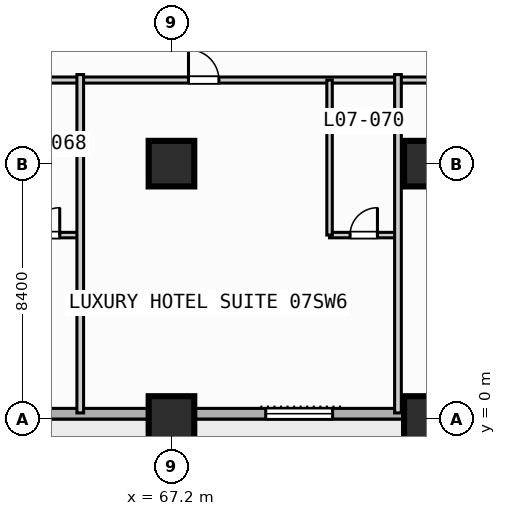
"""IFC4 building model, lengths in metres.
Left out: names, types, materials, properties, quantities, classifications, styles, units other than length and angle.
Written with IfcOpenShell. Run it as: python <this file> out.ifc"""

import sys

from ifc_helpers import new_model, si_unit, direction, frame, frame_2d, origin, origin_2d, place, context, subcontext, project, spatial, rectangle, extrude, element, fill, save


model = new_model("IFC4")
c1 = context("Model", 3, precision=1e-05, world=origin(), true_north=direction((0.0, 1.0)))
c2 = subcontext(c1, "Body", "Model", "MODEL_VIEW")
j1 = project(units=[si_unit("LENGTHUNIT", "METRE"), si_unit("PLANEANGLEUNIT", "RADIAN")], contexts=[c1])
p1 = place(None, origin())
s1 = spatial("IfcSite", under=j1, at=p1, CompositionType="ELEMENT")
p2 = place(p1, origin())
s2 = spatial("IfcBuilding", under=s1, at=p2, CompositionType="ELEMENT")
p3 = place(p2, frame((0.0, 0.0, 35.8)))
s3 = spatial("IfcBuildingStorey", under=s2, at=p3, CompositionType="ELEMENT", Elevation=35.8)
for number, where, z_axis, x_axis in (
    (1, (67.2, 0.0, 0.0), (0.0, 0.0, 1.0), (1.0, 0.0, 0.0)),
    (2, (67.2, 8.4, 0.0), (0.0, 0.0, 1.0), (1.0, 0.0, 0.0)),
    (3, (75.6, 0.0, 0.0), (0.0, 0.0, 1.0), (1.0, 0.0, 0.0)),
    (4, (75.6, 8.4, 0.0), (0.0, 0.0, 1.0), (1.0, 0.0, 0.0)),
):
    element("IfcColumn", number, at=place(p3, frame(where, z_axis=z_axis, x_axis=x_axis)), inside=s3, PredefinedType="COLUMN", context=c2, shape_type="SweptSolid", body=[
        extrude(rectangle(XDim=1.5, YDim=1.5, at=origin_2d()), origin(), (0.0, 0.0, 1.0), 3.8),
    ])
p4 = place(p3, frame((89.225, 0.175, 0.0), z_axis=(0.0, 0.0, 1.0), x_axis=(-1.0, 0.0, 0.0)))
e5 = element("IfcWall", 5, at=p4, inside=s3, PredefinedType="STANDARD", context=c2, shape_type="SweptSolid", body=[
    extrude(rectangle(XDim=86.05, YDim=0.35, at=frame_2d((43.025, 0.0))), origin(), (0.0, 0.0, 1.0), 3.55),
])
p5 = place(p4, frame((67.525, 0.0, 0.0)))
e6 = element("IfcOpeningElement", 6, at=p5, cuts=e5, PredefinedType="OPENING", context=c2, shape_type="SweptSolid", body=[
    extrude(rectangle(XDim=1.4, YDim=2.2, at=frame_2d((0.7, 1.1))), frame((0.0, 0.185, 0.0), z_axis=(0.0, -1.0, 0.0), x_axis=(1.0, 0.0, 0.0)), (0.0, 0.0, 1.0), 0.37),
])
p6 = place(p4, frame((58.725, 0.0, 0.85)))
e7 = element("IfcOpeningElement", 7, at=p6, cuts=e5, PredefinedType="OPENING", context=c2, shape_type="SweptSolid", body=[
    extrude(rectangle(XDim=2.2, YDim=1.8, at=frame_2d((1.1, 0.9))), frame((0.0, 0.185, 0.0), z_axis=(0.0, -1.0, 0.0), x_axis=(1.0, 0.0, 0.0)), (0.0, 0.0, 1.0), 0.37),
])
p7 = place(p4, frame((50.325, 0.0, 0.85)))
e8 = element("IfcOpeningElement", 8, at=p7, cuts=e5, PredefinedType="OPENING", context=c2, shape_type="SweptSolid", body=[
    extrude(rectangle(XDim=2.2, YDim=1.8, at=frame_2d((1.1, 0.9))), frame((0.0, 0.185, 0.0), z_axis=(0.0, -1.0, 0.0), x_axis=(1.0, 0.0, 0.0)), (0.0, 0.0, 1.0), 0.37),
])
p8 = place(p4, frame((41.925, 0.0, 0.85)))
e9 = element("IfcOpeningElement", 9, at=p8, cuts=e5, PredefinedType="OPENING", context=c2, shape_type="SweptSolid", body=[
    extrude(rectangle(XDim=2.2, YDim=1.8, at=frame_2d((1.1, 0.9))), frame((0.0, 0.185, 0.0), z_axis=(0.0, -1.0, 0.0), x_axis=(1.0, 0.0, 0.0)), (0.0, 0.0, 1.0), 0.37),
])
p9 = place(p4, frame((33.525, 0.0, 0.85)))
e10 = element("IfcOpeningElement", 10, at=p9, cuts=e5, PredefinedType="OPENING", context=c2, shape_type="SweptSolid", body=[
    extrude(rectangle(XDim=2.2, YDim=1.8, at=frame_2d((1.1, 0.9))), frame((0.0, 0.185, 0.0), z_axis=(0.0, -1.0, 0.0), x_axis=(1.0, 0.0, 0.0)), (0.0, 0.0, 1.0), 0.37),
])
p10 = place(p4, frame((16.725, 0.0, 0.85)))
e11 = element("IfcOpeningElement", 11, at=p10, cuts=e5, PredefinedType="OPENING", context=c2, shape_type="SweptSolid", body=[
    extrude(rectangle(XDim=2.2, YDim=1.8, at=frame_2d((1.1, 0.9))), frame((0.0, 0.185, 0.0), z_axis=(0.0, -1.0, 0.0), x_axis=(1.0, 0.0, 0.0)), (0.0, 0.0, 1.0), 0.37),
])
p11 = place(p4, frame((8.325, 0.0, 0.85)))
e12 = element("IfcOpeningElement", 12, at=p11, cuts=e5, PredefinedType="OPENING", context=c2, shape_type="SweptSolid", body=[
    extrude(rectangle(XDim=2.2, YDim=1.8, at=frame_2d((1.1, 0.9))), frame((0.0, 0.185, 0.0), z_axis=(0.0, -1.0, 0.0), x_axis=(1.0, 0.0, 0.0)), (0.0, 0.0, 1.0), 0.37),
])
p12 = place(p4, frame((2.4, 0.0, 0.85)))
e13 = element("IfcOpeningElement", 13, at=p12, cuts=e5, PredefinedType="OPENING", context=c2, shape_type="SweptSolid", body=[
    extrude(rectangle(XDim=1.8, YDim=1.8, at=frame_2d((0.9, 0.9))), frame((0.0, 0.185, 0.0), z_axis=(0.0, -1.0, 0.0), x_axis=(1.0, 0.0, 0.0)), (0.0, 0.0, 1.0), 0.37),
])
p13 = place(p3, frame((13.4, 11.15, 0.0), z_axis=(0.0, 0.0, 1.0), x_axis=(1.0, 0.0, 0.0)))
e14 = element("IfcWall", 14, at=p13, inside=s3, PredefinedType="PARTITIONING", context=c2, shape_type="SweptSolid", body=[
    extrude(rectangle(XDim=75.4, YDim=0.2, at=frame_2d((37.7, 0.0))), origin(), (0.0, 0.0, 1.0), 3.55),
])
p14 = place(p13, frame((6.065, 0.0, 0.0)))
e15 = element("IfcOpeningElement", 15, at=p14, cuts=e14, PredefinedType="OPENING", context=c2, shape_type="SweptSolid", body=[
    extrude(rectangle(XDim=1.0, YDim=2.15, at=frame_2d((0.5, 1.075))), frame((0.0, 0.11, 0.0), z_axis=(0.0, -1.0, 0.0), x_axis=(1.0, 0.0, 0.0)), (0.0, 0.0, 1.0), 0.22),
])
p15 = place(p13, frame((13.36, 0.0, 0.0)))
e16 = element("IfcOpeningElement", 16, at=p15, cuts=e14, PredefinedType="OPENING", context=c2, shape_type="SweptSolid", body=[
    extrude(rectangle(XDim=1.0, YDim=2.15, at=frame_2d((0.5, 1.075))), frame((0.0, 0.11, 0.0), z_axis=(0.0, -1.0, 0.0), x_axis=(1.0, 0.0, 0.0)), (0.0, 0.0, 1.0), 0.22),
])
p16 = place(p13, frame((21.785, 0.0, 0.0)))
e17 = element("IfcOpeningElement", 17, at=p16, cuts=e14, PredefinedType="OPENING", context=c2, shape_type="SweptSolid", body=[
    extrude(rectangle(XDim=1.0, YDim=2.15, at=frame_2d((0.5, 1.075))), frame((0.0, 0.11, 0.0), z_axis=(0.0, -1.0, 0.0), x_axis=(1.0, 0.0, 0.0)), (0.0, 0.0, 1.0), 0.22),
])
p17 = place(p13, frame((30.185, 0.0, 0.0)))
e18 = element("IfcOpeningElement", 18, at=p17, cuts=e14, PredefinedType="OPENING", context=c2, shape_type="SweptSolid", body=[
    extrude(rectangle(XDim=1.0, YDim=2.15, at=frame_2d((0.5, 1.075))), frame((0.0, 0.11, 0.0), z_axis=(0.0, -1.0, 0.0), x_axis=(1.0, 0.0, 0.0)), (0.0, 0.0, 1.0), 0.22),
])
p18 = place(p13, frame((41.76, 0.0, 0.0)))
e19 = element("IfcOpeningElement", 19, at=p18, cuts=e14, PredefinedType="OPENING", context=c2, shape_type="SweptSolid", body=[
    extrude(rectangle(XDim=1.0, YDim=2.15, at=frame_2d((0.5, 1.075))), frame((0.0, 0.11, 0.0), z_axis=(0.0, -1.0, 0.0), x_axis=(1.0, 0.0, 0.0)), (0.0, 0.0, 1.0), 0.22),
])
p19 = place(p13, frame((54.36, 0.0, 0.0)))
e20 = element("IfcOpeningElement", 20, at=p19, cuts=e14, PredefinedType="OPENING", context=c2, shape_type="SweptSolid", body=[
    extrude(rectangle(XDim=1.0, YDim=2.15, at=frame_2d((0.5, 1.075))), frame((0.0, 0.11, 0.0), z_axis=(0.0, -1.0, 0.0), x_axis=(1.0, 0.0, 0.0)), (0.0, 0.0, 1.0), 0.22),
])
p20 = place(p13, frame((63.785, 0.0, 0.0)))
e21 = element("IfcOpeningElement", 21, at=p20, cuts=e14, PredefinedType="OPENING", context=c2, shape_type="SweptSolid", body=[
    extrude(rectangle(XDim=1.0, YDim=2.15, at=frame_2d((0.5, 1.075))), frame((0.0, 0.11, 0.0), z_axis=(0.0, -1.0, 0.0), x_axis=(1.0, 0.0, 0.0)), (0.0, 0.0, 1.0), 0.22),
])
p21 = place(p13, frame((70.86, 0.0, 0.0)))
e22 = element("IfcOpeningElement", 22, at=p21, cuts=e14, PredefinedType="OPENING", context=c2, shape_type="SweptSolid", body=[
    extrude(rectangle(XDim=1.0, YDim=2.15, at=frame_2d((0.5, 1.075))), frame((0.0, 0.11, 0.0), z_axis=(0.0, -1.0, 0.0), x_axis=(1.0, 0.0, 0.0)), (0.0, 0.0, 1.0), 0.22),
])
p22 = place(p3, frame((61.95, 6.05, 0.0), z_axis=(0.0, 0.0, 1.0), x_axis=(1.0, 0.0, 0.0)))
e23 = element("IfcWall", 23, at=p22, inside=s3, PredefinedType="PLUMBINGWALL", context=c2, shape_type="SweptSolid", body=[
    extrude(rectangle(XDim=2.25, YDim=0.18, at=frame_2d((1.125, 0.0))), origin(), (0.0, 0.0, 1.0), 3.55),
])
p23 = place(p22, frame((0.675, 0.0, 0.0)))
e24 = element("IfcOpeningElement", 24, at=p23, cuts=e23, PredefinedType="OPENING", context=c2, shape_type="SweptSolid", body=[
    extrude(rectangle(XDim=0.9, YDim=2.1, at=frame_2d((0.45, 1.05))), frame((0.0, 0.1, 0.0), z_axis=(0.0, -1.0, 0.0), x_axis=(1.0, 0.0, 0.0)), (0.0, 0.0, 1.0), 0.2),
])
p24 = place(p3, frame((64.2, 0.2, 0.0), z_axis=(0.0, 0.0, 1.0), x_axis=(0.0, 1.0, 0.0)))
e25 = element("IfcWall", 25, at=p24, inside=s3, PredefinedType="PARTITIONING", context=c2, shape_type="SweptSolid", body=[
    extrude(rectangle(XDim=11.13, YDim=0.22, at=frame_2d((5.565, 0.0))), origin(), (0.0, 0.0, 1.0), 3.55),
])
p25 = place(p3, frame((72.4, 6.05, 0.0), z_axis=(0.0, 0.0, 1.0), x_axis=(1.0, 0.0, 0.0)))
e26 = element("IfcWall", 26, at=p25, inside=s3, PredefinedType="PLUMBINGWALL", context=c2, shape_type="SweptSolid", body=[
    extrude(rectangle(XDim=2.25, YDim=0.18, at=frame_2d((1.125, 0.0))), origin(), (0.0, 0.0, 1.0), 3.55),
])
p26 = place(p25, frame((0.675, 0.0, 0.0)))
e27 = element("IfcOpeningElement", 27, at=p26, cuts=e26, PredefinedType="OPENING", context=c2, shape_type="SweptSolid", body=[
    extrude(rectangle(XDim=0.9, YDim=2.1, at=frame_2d((0.45, 1.05))), frame((0.0, 0.1, 0.0), z_axis=(0.0, -1.0, 0.0), x_axis=(1.0, 0.0, 0.0)), (0.0, 0.0, 1.0), 0.2),
])
p27 = place(p3, frame((72.4, 6.05, 0.0), z_axis=(0.0, 0.0, 1.0), x_axis=(0.0, 1.0, 0.0)))
e28 = element("IfcWall", 28, at=p27, inside=s3, PredefinedType="PLUMBINGWALL", context=c2, shape_type="SweptSolid", body=[
    extrude(rectangle(XDim=5.1, YDim=0.18, at=frame_2d((2.55, 0.0))), origin(), (0.0, 0.0, 1.0), 3.55),
])
p28 = place(p3, frame((74.65, 0.2, 0.0), z_axis=(0.0, 0.0, 1.0), x_axis=(0.0, 1.0, 0.0)))
e29 = element("IfcWall", 29, at=p28, inside=s3, PredefinedType="PARTITIONING", context=c2, shape_type="SweptSolid", body=[
    extrude(rectangle(XDim=11.13, YDim=0.22, at=frame_2d((5.565, 0.0))), origin(), (0.0, 0.0, 1.0), 3.55),
])
p29 = place(p10, origin())
e30 = element("IfcWindow", 30, at=p29, inside=s3, PartitioningType="SINGLE_PANEL", PredefinedType="WINDOW", context=c2, shape_type="SweptSolid", body=[
    extrude(rectangle(XDim=2.2, YDim=1.8, at=frame_2d((1.1, 0.9))), frame((0.0, 0.03, 0.0), z_axis=(0.0, -1.0, 0.0), x_axis=(1.0, 0.0, 0.0)), (0.0, 0.0, 1.0), 0.06),
])
fill(e11, e30)
p30 = place(p19, origin())
e31 = element("IfcDoor", 31, at=p30, inside=s3, OperationType="SINGLE_SWING_LEFT", PredefinedType="DOOR", context=c2, shape_type="SweptSolid", body=[
    extrude(rectangle(XDim=1.0, YDim=2.15, at=frame_2d((0.5, 1.075))), frame((0.0, 0.025, 0.0), z_axis=(0.0, -1.0, 0.0), x_axis=(1.0, 0.0, 0.0)), (0.0, 0.0, 1.0), 0.05),
])
fill(e20, e31)
p31 = place(p23, origin())
e32 = element("IfcDoor", 32, at=p31, inside=s3, OperationType="SINGLE_SWING_RIGHT", PredefinedType="DOOR", context=c2, shape_type="SweptSolid", body=[
    extrude(rectangle(XDim=0.9, YDim=2.1, at=frame_2d((0.45, 1.05))), frame((0.0, 0.025, 0.0), z_axis=(0.0, -1.0, 0.0), x_axis=(1.0, 0.0, 0.0)), (0.0, 0.0, 1.0), 0.05),
])
fill(e24, e32)
p32 = place(p26, origin())
e33 = element("IfcDoor", 33, at=p32, inside=s3, OperationType="SINGLE_SWING_RIGHT", PredefinedType="DOOR", context=c2, shape_type="SweptSolid", body=[
    extrude(rectangle(XDim=0.9, YDim=2.1, at=frame_2d((0.45, 1.05))), frame((0.0, 0.025, 0.0), z_axis=(0.0, -1.0, 0.0), x_axis=(1.0, 0.0, 0.0)), (0.0, 0.0, 1.0), 0.05),
])
fill(e27, e33)
save(model, sys.argv[1])
